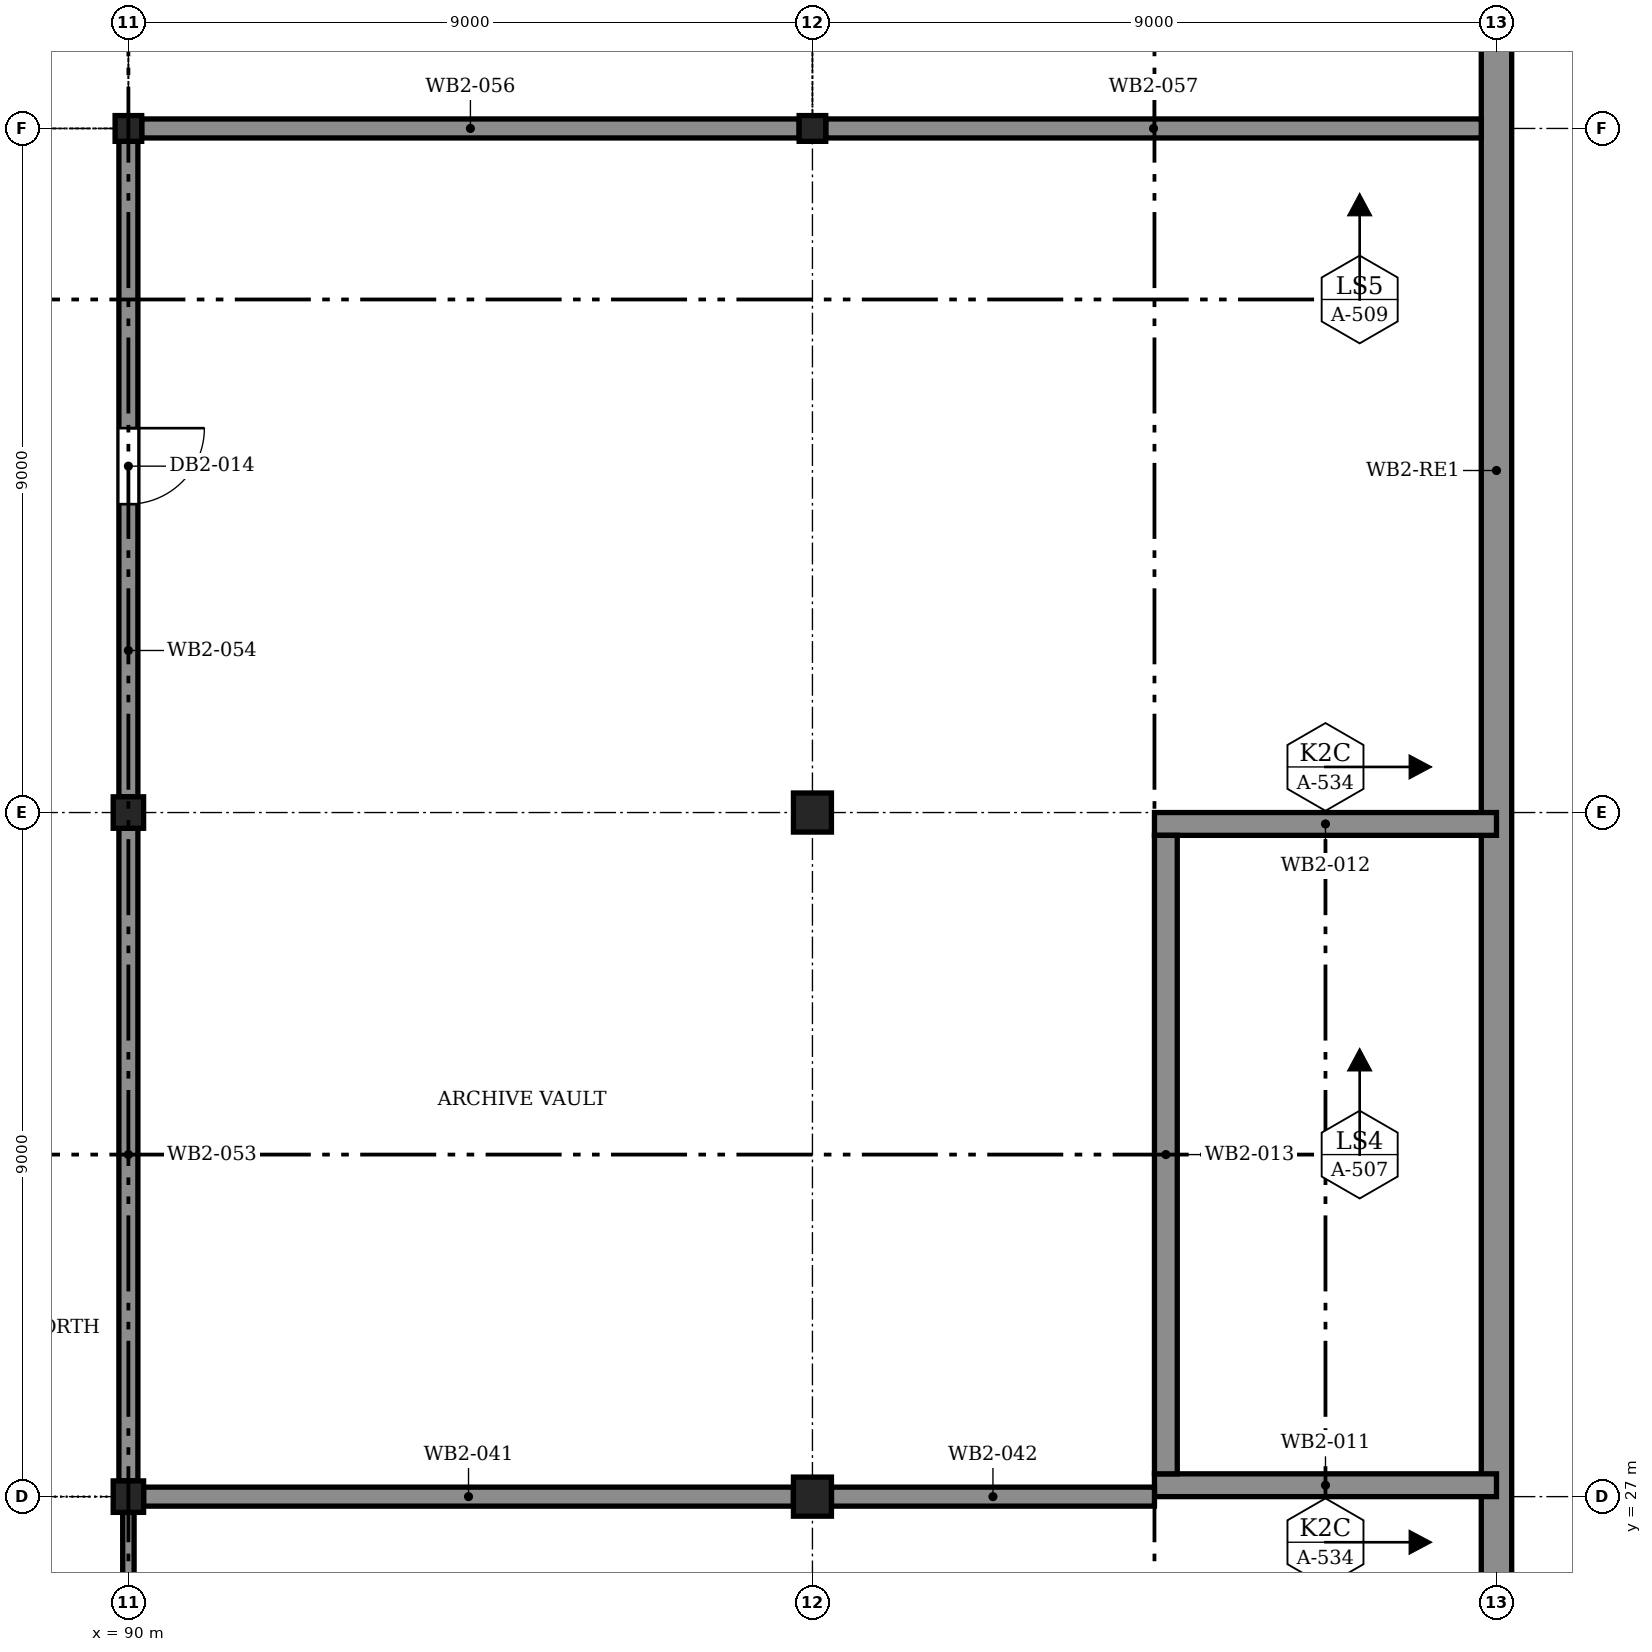
"""IFC4 building model, lengths in metres.
Left out: names, types, materials, properties, quantities, classifications, styles, units other than length and angle.
Written with IfcOpenShell. Run it as: python <this file> out.ifc"""

import sys

from ifc_helpers import new_model, si_unit, direction, frame, frame_2d, origin, origin_2d, place, context, subcontext, project, spatial, rectangle, i_section, extrude, element, fill, save


model = new_model("IFC4")
c1 = context("Model", 3, precision=1e-05, world=origin(), true_north=direction((0.0, 1.0)))
c2 = subcontext(c1, "Body", "Model", "MODEL_VIEW")
j1 = project(units=[si_unit("LENGTHUNIT", "METRE"), si_unit("PLANEANGLEUNIT", "RADIAN")], contexts=[c1])
p1 = place(None, origin())
s1 = spatial("IfcSite", under=j1, at=p1, CompositionType="ELEMENT")
p2 = place(p1, origin())
s2 = spatial("IfcBuilding", under=s1, at=p2, CompositionType="ELEMENT")
p3 = place(p2, frame((0.0, 0.0, -9.6)))
s3 = spatial("IfcBuildingStorey", under=s2, at=p3, CompositionType="ELEMENT", Elevation=-9.6)
p4 = place(p3, frame((108.0, 18.0, 0.0), z_axis=(0.0, 0.0, 1.0), x_axis=(0.0, 1.0, 0.0)))
e1 = element("IfcWall", 1, at=p4, inside=s3, PredefinedType="SOLIDWALL", context=c2, shape_type="SweptSolid", body=[
    extrude(rectangle(XDim=45.0, YDim=0.4, at=frame_2d((22.5, 0.0))), origin(), (0.0, 0.0, 1.0), 4.8),
])
p5 = place(p3, frame((90.0, 27.0, -0.6), z_axis=(0.0, 0.0, 1.0), x_axis=(1.0, 0.0, 0.0)))
e2 = element("IfcColumn", 2, at=p5, inside=s3, PredefinedType="COLUMN", context=c2, shape_type="SweptSolid", body=[
    extrude(i_section(OverallWidth=0.4, OverallDepth=0.414, WebThickness=0.025, FlangeThickness=0.032, at=origin_2d()), origin(), (0.0, 0.0, 1.0), 5.4),
])
p6 = place(p3, frame((99.0, 27.0, -0.6), z_axis=(0.0, 0.0, 1.0), x_axis=(1.0, 0.0, 0.0)))
e3 = element("IfcColumn", 3, at=p6, inside=s3, PredefinedType="COLUMN", context=c2, shape_type="SweptSolid", body=[
    extrude(i_section(OverallWidth=0.5, OverallDepth=0.514, WebThickness=0.025, FlangeThickness=0.032, at=origin_2d()), origin(), (0.0, 0.0, 1.0), 5.4),
])
p7 = place(p3, frame((90.0, 36.0, -0.6), z_axis=(0.0, 0.0, 1.0), x_axis=(1.0, 0.0, 0.0)))
e4 = element("IfcColumn", 4, at=p7, inside=s3, PredefinedType="COLUMN", context=c2, shape_type="SweptSolid", body=[
    extrude(i_section(OverallWidth=0.4, OverallDepth=0.414, WebThickness=0.025, FlangeThickness=0.032, at=origin_2d()), origin(), (0.0, 0.0, 1.0), 5.4),
])
p8 = place(p3, frame((99.0, 36.0, -0.6), z_axis=(0.0, 0.0, 1.0), x_axis=(1.0, 0.0, 0.0)))
e5 = element("IfcColumn", 5, at=p8, inside=s3, PredefinedType="COLUMN", context=c2, shape_type="SweptSolid", body=[
    extrude(i_section(OverallWidth=0.5, OverallDepth=0.514, WebThickness=0.025, FlangeThickness=0.032, at=origin_2d()), origin(), (0.0, 0.0, 1.0), 5.4),
])
for number, where, z_axis, x_axis in (
    (6, (90.0, 45.0, -0.6), (0.0, 0.0, 1.0), (1.0, 0.0, 0.0)),
    (7, (99.0, 45.0, -0.6), (0.0, 0.0, 1.0), (1.0, 0.0, 0.0)),
):
    element("IfcColumn", number, at=place(p3, frame(where, z_axis=z_axis, x_axis=x_axis)), inside=s3, PredefinedType="COLUMN", context=c2, shape_type="SweptSolid", body=[
        extrude(i_section(OverallWidth=0.35, OverallDepth=0.339, WebThickness=0.025, FlangeThickness=0.032, at=origin_2d()), origin(), (0.0, 0.0, 1.0), 5.4),
    ])
for number, where, z_axis, x_axis in (
    (8, (103.5, 27.15, 0.0), (0.0, 0.0, 1.0), (1.0, 0.0, 0.0)),
    (9, (103.5, 35.85, 0.0), (0.0, 0.0, 1.0), (1.0, 0.0, 0.0)),
):
    element("IfcWall", number, at=place(p3, frame(where, z_axis=z_axis, x_axis=x_axis)), inside=s3, PredefinedType="SOLIDWALL", context=c2, shape_type="SweptSolid", body=[
        extrude(rectangle(XDim=4.5, YDim=0.3, at=frame_2d((2.25, 0.0))), origin(), (0.0, 0.0, 1.0), 4.8),
    ])
p9 = place(p3, frame((103.65, 27.3, 0.0), z_axis=(0.0, 0.0, 1.0), x_axis=(0.0, 1.0, 0.0)))
e10 = element("IfcWall", 10, at=p9, inside=s3, PredefinedType="SOLIDWALL", context=c2, shape_type="SweptSolid", body=[
    extrude(rectangle(XDim=8.4, YDim=0.3, at=frame_2d((4.2, 0.0))), origin(), (0.0, 0.0, 1.0), 4.8),
])
p10 = place(p3, frame((90.0, 22.5, 0.0), z_axis=(0.0, 0.0, 1.0), x_axis=(0.0, 1.0, 0.0)))
e11 = element("IfcWall", 11, at=p10, inside=s3, PredefinedType="PARTITIONING", context=c2, shape_type="SweptSolid", body=[
    extrude(rectangle(XDim=4.293, YDim=0.15, at=frame_2d((2.146, 0.0))), origin(), (0.0, 0.0, 1.0), 3.758),
])
p11 = place(p10, frame((0.81, 0.0, 0.0)))
e12 = element("IfcOpeningElement", 12, at=p11, cuts=e11, PredefinedType="OPENING", context=c2, shape_type="SweptSolid", body=[
    extrude(rectangle(XDim=1.0, YDim=2.1, at=frame_2d((0.5, 1.05))), frame((0.0, 0.085, 0.0), z_axis=(0.0, -1.0, 0.0), x_axis=(1.0, 0.0, 0.0)), (0.0, 0.0, 1.0), 0.17),
])
p12 = place(p3, frame((90.2, 27.0, 0.0), z_axis=(0.0, 0.0, 1.0), x_axis=(1.0, 0.0, 0.0)))
e13 = element("IfcWall", 13, at=p12, inside=s3, PredefinedType="PARTITIONING", context=c2, shape_type="SweptSolid", body=[
    extrude(rectangle(XDim=8.55, YDim=0.25, at=frame_2d((4.275, 0.0))), origin(), (0.0, 0.0, 1.0), 3.758),
])
p13 = place(p3, frame((99.25, 27.0, 0.0), z_axis=(0.0, 0.0, 1.0), x_axis=(1.0, 0.0, 0.0)))
e14 = element("IfcWall", 14, at=p13, inside=s3, PredefinedType="PARTITIONING", context=c2, shape_type="SweptSolid", body=[
    extrude(rectangle(XDim=4.25, YDim=0.25, at=frame_2d((2.125, 0.0))), origin(), (0.0, 0.0, 1.0), 3.758),
])
p14 = place(p3, frame((90.0, 27.207, 0.0), z_axis=(0.0, 0.0, 1.0), x_axis=(0.0, 1.0, 0.0)))
e15 = element("IfcWall", 15, at=p14, inside=s3, PredefinedType="PARTITIONING", context=c2, shape_type="SweptSolid", body=[
    extrude(rectangle(XDim=8.586, YDim=0.25, at=frame_2d((4.293, 0.0))), origin(), (0.0, 0.0, 1.0), 3.758),
])
p15 = place(p3, frame((90.0, 36.207, 0.0), z_axis=(0.0, 0.0, 1.0), x_axis=(0.0, 1.0, 0.0)))
e16 = element("IfcWall", 16, at=p15, inside=s3, PredefinedType="PARTITIONING", context=c2, shape_type="SweptSolid", body=[
    extrude(rectangle(XDim=8.624, YDim=0.25, at=frame_2d((4.312, 0.0))), origin(), (0.0, 0.0, 1.0), 3.758),
])
p16 = place(p15, frame((3.85, 0.0, 0.0)))
e17 = element("IfcOpeningElement", 17, at=p16, cuts=e16, PredefinedType="OPENING", context=c2, shape_type="SweptSolid", body=[
    extrude(rectangle(XDim=1.0, YDim=2.1, at=frame_2d((0.5, 1.05))), frame((0.0, 0.135, 0.0), z_axis=(0.0, -1.0, 0.0), x_axis=(1.0, 0.0, 0.0)), (0.0, 0.0, 1.0), 0.27),
])
p17 = place(p3, frame((90.175, 45.0, 0.0), z_axis=(0.0, 0.0, 1.0), x_axis=(1.0, 0.0, 0.0)))
e18 = element("IfcWall", 18, at=p17, inside=s3, PredefinedType="PARTITIONING", context=c2, shape_type="SweptSolid", body=[
    extrude(rectangle(XDim=8.65, YDim=0.25, at=frame_2d((4.325, 0.0))), origin(), (0.0, 0.0, 1.0), 3.758),
])
p18 = place(p3, frame((99.175, 45.0, 0.0), z_axis=(0.0, 0.0, 1.0), x_axis=(1.0, 0.0, 0.0)))
e19 = element("IfcWall", 19, at=p18, inside=s3, PredefinedType="PARTITIONING", context=c2, shape_type="SweptSolid", body=[
    extrude(rectangle(XDim=8.625, YDim=0.25, at=frame_2d((4.312, 0.0))), origin(), (0.0, 0.0, 1.0), 3.758),
])
p19 = place(p16, frame((1.0, 0.0, 0.0), z_axis=(0.0, 0.0, 1.0), x_axis=(-1.0, 0.0, 0.0)))
e20 = element("IfcDoor", 20, at=p19, inside=s3, OperationType="SINGLE_SWING_RIGHT", PredefinedType="DOOR", context=c2, shape_type="SweptSolid", body=[
    extrude(rectangle(XDim=1.0, YDim=2.1, at=frame_2d((0.5, 1.05))), frame((0.0, 0.025, 0.0), z_axis=(0.0, -1.0, 0.0), x_axis=(1.0, 0.0, 0.0)), (0.0, 0.0, 1.0), 0.05),
])
fill(e17, e20)
save(model, sys.argv[1])
